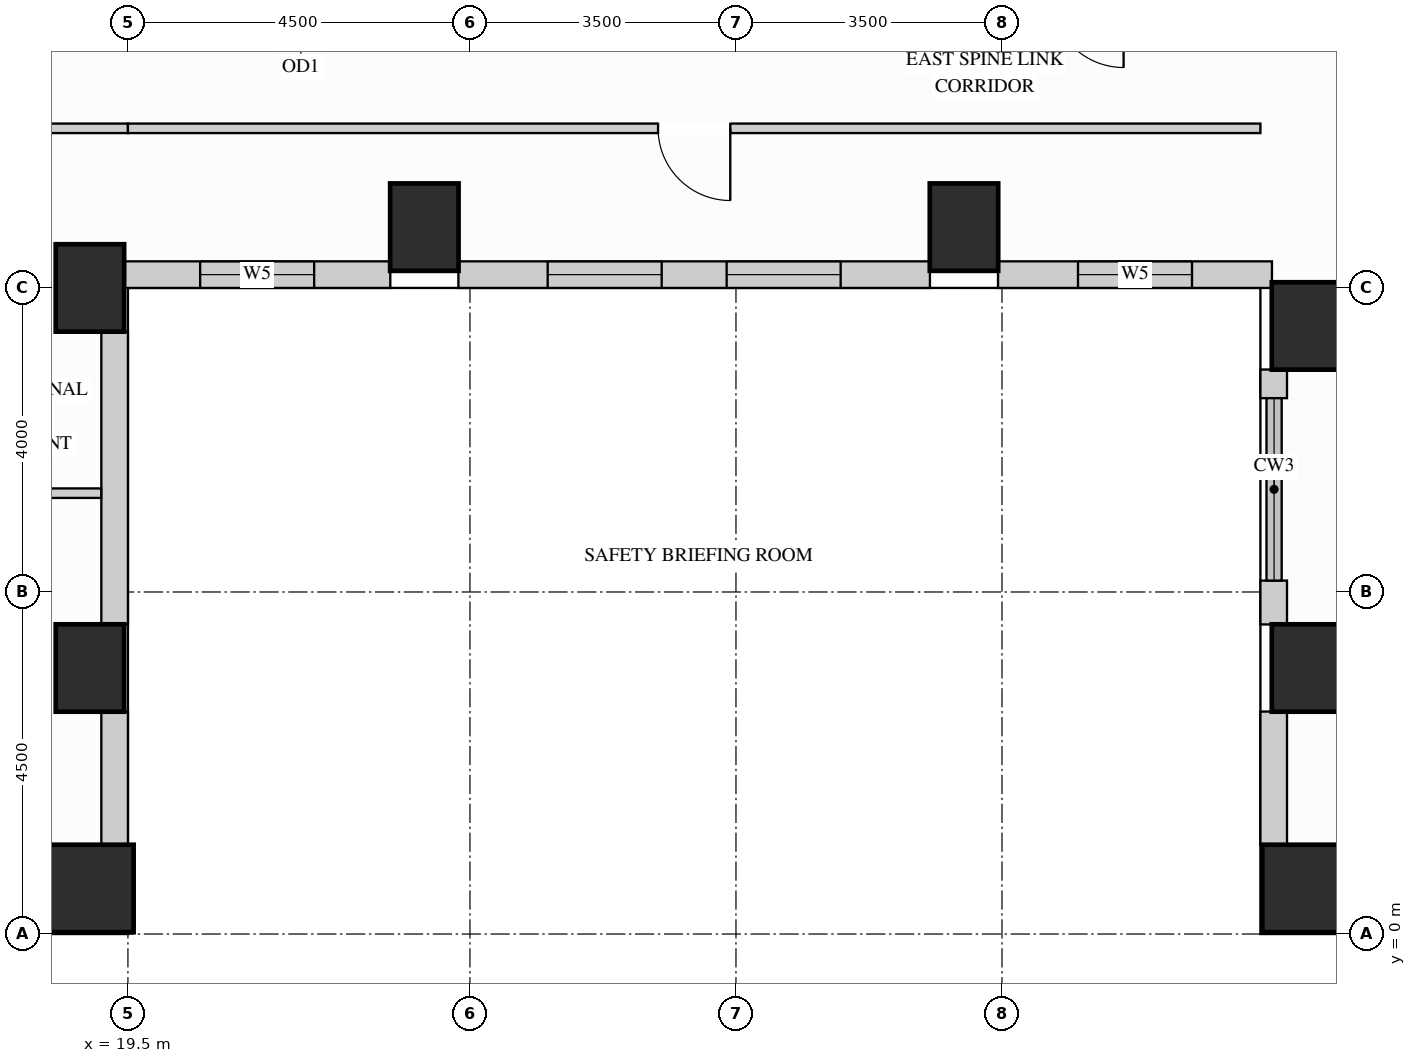
"""IFC4 building model, lengths in metres.
Left out: names, types, materials, properties, quantities, classifications, styles, units other than length and angle.
Written with IfcOpenShell. Run it as: python <this file> out.ifc"""

import sys

from ifc_helpers import new_model, si_unit, direction, frame, frame_2d, origin, origin_2d, place, context, subcontext, project, spatial, rectangle, extrude, source, transform, mapped, element, fill, save


model = new_model("IFC4")
c1 = context("Model", 3, precision=1e-05, world=origin(), true_north=direction((0.0, 1.0)))
c2 = subcontext(c1, "Body", "Model", "MODEL_VIEW")
j1 = project(units=[si_unit("LENGTHUNIT", "METRE"), si_unit("PLANEANGLEUNIT", "RADIAN")], contexts=[c1])
p1 = place(None, origin())
s1 = spatial("IfcSite", under=j1, at=p1, CompositionType="ELEMENT")
p2 = place(p1, origin())
s2 = spatial("IfcBuilding", under=s1, at=p2, CompositionType="ELEMENT")
p3 = place(p2, frame((0.0, 0.0, 117.0)))
s3 = spatial("IfcBuildingStorey", under=s2, at=p3, CompositionType="ELEMENT", Elevation=117.0)
m1 = source(origin(), c2, "Body", "SweptSolid", [
    extrude(rectangle(XDim=0.9, YDim=1.15, at=origin_2d()), origin(), (0.0, 0.0, 1.0), 3.38),
])
for number, where, z_axis, x_axis in (
    (1, (19.0, 3.5, 0.0), (0.0, 0.0, 1.0), (1.0, 0.0, 0.0)),
    (2, (19.0, 8.5, 0.0), (0.0, 0.0, 1.0), (1.0, 0.0, 0.0)),
    (3, (35.0, 3.5, 0.0), (0.0, 0.0, 1.0), (1.0, 0.0, 0.0)),
    (4, (35.0, 8.0, 0.0), (0.0, 0.0, 1.0), (1.0, 0.0, 0.0)),
    (5, (23.4, 9.3, 0.0), (0.0, 0.0, 1.0), (1.0, 0.0, 0.0)),
    (6, (30.5, 9.3, 0.0), (0.0, 0.0, 1.0), (1.0, 0.0, 0.0)),
):
    element("IfcColumn", number, at=place(p3, frame(where, z_axis=z_axis, x_axis=x_axis)), inside=s3, PredefinedType="COLUMN", context=c2, shape_type="MappedRepresentation", body=[
        mapped(m1, transform((0.0, 0.0, 0.0), x_axis=(1.0, 0.0, 0.0), y_axis=(0.0, 1.0, 0.0), z_axis=(0.0, 0.0, 1.0))),
    ])
m2 = source(origin(), c2, "Body", "SweptSolid", [
    extrude(rectangle(XDim=1.15, YDim=1.15, at=origin_2d()), origin(), (0.0, 0.0, 1.0), 3.38),
])
for number, where, z_axis, x_axis in (
    (7, (19.0, 0.6, 0.0), (0.0, 0.0, 1.0), (1.0, 0.0, 0.0)),
    (8, (35.0, 0.6, 0.0), (0.0, 0.0, 1.0), (1.0, 0.0, 0.0)),
):
    element("IfcColumn", number, at=place(p3, frame(where, z_axis=z_axis, x_axis=x_axis)), inside=s3, PredefinedType="COLUMN", context=c2, shape_type="MappedRepresentation", body=[
        mapped(m2, transform((0.0, 0.0, 0.0), x_axis=(1.0, 0.0, 0.0), y_axis=(0.0, 1.0, 0.0), z_axis=(0.0, 0.0, 1.0))),
    ])
m3 = source(origin(), c2, "Body", "SweptSolid", [
    extrude(rectangle(XDim=1.754, YDim=0.35, at=frame_2d((0.877, 0.0))), origin(), (0.0, 0.0, 1.0), 2.519),
])
p4 = place(p3, frame((19.325, 1.173, 0.0), z_axis=(0.0, 0.0, 1.0), x_axis=(0.0, 1.0, 0.0)))
e9 = element("IfcWall", 9, at=p4, inside=s3, PredefinedType="SOLIDWALL", context=c2, shape_type="MappedRepresentation", body=[
    mapped(m3, transform((0.0, 0.0, 0.0), x_axis=(1.0, 0.0, 0.0), y_axis=(0.0, 1.0, 0.0), z_axis=(0.0, 0.0, 1.0))),
])
m4 = source(origin(), c2, "Body", "SweptSolid", [
    extrude(rectangle(XDim=3.854, YDim=0.35, at=frame_2d((1.927, 0.0))), origin(), (0.0, 0.0, 1.0), 2.519),
])
p5 = place(p3, frame((19.325, 4.073, 0.0), z_axis=(0.0, 0.0, 1.0), x_axis=(0.0, 1.0, 0.0)))
e10 = element("IfcWall", 10, at=p5, inside=s3, PredefinedType="SOLIDWALL", context=c2, shape_type="MappedRepresentation", body=[
    mapped(m4, transform((0.0, 0.0, 0.0), x_axis=(1.0, 0.0, 0.0), y_axis=(0.0, 1.0, 0.0), z_axis=(0.0, 0.0, 1.0))),
])
p6 = place(p3, frame((19.448, 8.675, 0.0), z_axis=(0.0, 0.0, 1.0), x_axis=(1.0, 0.0, 0.0)))
e11 = element("IfcWall", 11, at=p6, inside=s3, PredefinedType="SOLIDWALL", context=c2, shape_type="SweptSolid", body=[
    extrude(rectangle(XDim=3.504, YDim=0.35, at=frame_2d((1.752, 0.0))), origin(), (0.0, 0.0, 1.0), 3.365),
])
p7 = place(p6, frame((1.002, 0.0, 0.78)))
e12 = element("IfcOpeningElement", 12, at=p7, cuts=e11, PredefinedType="OPENING", context=c2, shape_type="SweptSolid", body=[
    extrude(rectangle(XDim=1.5, YDim=2.0, at=frame_2d((0.75, 1.0))), frame((0.0, 0.185, 0.0), z_axis=(0.0, -1.0, 0.0), x_axis=(1.0, 0.0, 0.0)), (0.0, 0.0, 1.0), 0.37),
])
p8 = place(p3, frame((23.848, 8.675, 0.0), z_axis=(0.0, 0.0, 1.0), x_axis=(1.0, 0.0, 0.0)))
e13 = element("IfcWall", 13, at=p8, inside=s3, PredefinedType="SOLIDWALL", context=c2, shape_type="SweptSolid", body=[
    extrude(rectangle(XDim=6.204, YDim=0.35, at=frame_2d((3.102, 0.0))), origin(), (0.0, 0.0, 1.0), 3.365),
])
p9 = place(p8, frame((1.175, 0.0, 0.78)))
e14 = element("IfcOpeningElement", 14, at=p9, cuts=e13, PredefinedType="OPENING", context=c2, shape_type="SweptSolid", body=[
    extrude(rectangle(XDim=1.5, YDim=2.0, at=frame_2d((0.75, 1.0))), frame((0.0, 0.185, 0.0), z_axis=(0.0, -1.0, 0.0), x_axis=(1.0, 0.0, 0.0)), (0.0, 0.0, 1.0), 0.37),
])
p10 = place(p8, frame((3.529, 0.0, 0.78)))
e15 = element("IfcOpeningElement", 15, at=p10, cuts=e13, PredefinedType="OPENING", context=c2, shape_type="SweptSolid", body=[
    extrude(rectangle(XDim=1.5, YDim=2.0, at=frame_2d((0.75, 1.0))), frame((0.0, 0.185, 0.0), z_axis=(0.0, -1.0, 0.0), x_axis=(1.0, 0.0, 0.0)), (0.0, 0.0, 1.0), 0.37),
])
p11 = place(p3, frame((30.948, 8.675, 0.0), z_axis=(0.0, 0.0, 1.0), x_axis=(1.0, 0.0, 0.0)))
e16 = element("IfcWall", 16, at=p11, inside=s3, PredefinedType="SOLIDWALL", context=c2, shape_type="SweptSolid", body=[
    extrude(rectangle(XDim=3.604, YDim=0.35, at=frame_2d((1.802, 0.0))), origin(), (0.0, 0.0, 1.0), 3.365),
])
p12 = place(p11, frame((1.052, 0.0, 0.78)))
e17 = element("IfcOpeningElement", 17, at=p12, cuts=e16, PredefinedType="OPENING", context=c2, shape_type="SweptSolid", body=[
    extrude(rectangle(XDim=1.5, YDim=2.0, at=frame_2d((0.75, 1.0))), frame((0.0, 0.185, 0.0), z_axis=(0.0, -1.0, 0.0), x_axis=(1.0, 0.0, 0.0)), (0.0, 0.0, 1.0), 0.37),
])
m5 = source(origin(), c2, "Body", "SweptSolid", [
    extrude(rectangle(XDim=0.377, YDim=0.35, at=frame_2d((0.188, 0.0))), origin(), (0.0, 0.0, 1.0), 3.365),
])
p13 = place(p3, frame((34.575, 7.427, 0.0), z_axis=(0.0, 0.0, 1.0), x_axis=(0.0, -1.0, 0.0)))
e18 = element("IfcWall", 18, at=p13, inside=s3, PredefinedType="SOLIDWALL", context=c2, shape_type="MappedRepresentation", body=[
    mapped(m5, transform((0.0, 0.0, 0.0), x_axis=(1.0, 0.0, 0.0), y_axis=(0.0, 1.0, 0.0), z_axis=(0.0, 0.0, 1.0))),
])
m6 = source(origin(), c2, "Body", "SweptSolid", [
    extrude(rectangle(XDim=0.577, YDim=0.35, at=frame_2d((0.289, 0.0))), origin(), (0.0, 0.0, 1.0), 3.365),
])
p14 = place(p3, frame((34.575, 4.65, 0.0), z_axis=(0.0, 0.0, 1.0), x_axis=(0.0, -1.0, 0.0)))
e19 = element("IfcWall", 19, at=p14, inside=s3, PredefinedType="SOLIDWALL", context=c2, shape_type="MappedRepresentation", body=[
    mapped(m6, transform((0.0, 0.0, 0.0), x_axis=(1.0, 0.0, 0.0), y_axis=(0.0, 1.0, 0.0), z_axis=(0.0, 0.0, 1.0))),
])
m7 = source(origin(), c2, "Body", "SweptSolid", [
    extrude(rectangle(XDim=1.754, YDim=0.35, at=frame_2d((0.877, 0.0))), origin(), (0.0, 0.0, 1.0), 3.365),
])
p15 = place(p3, frame((34.575, 2.927, 0.0), z_axis=(0.0, 0.0, 1.0), x_axis=(0.0, -1.0, 0.0)))
e20 = element("IfcWall", 20, at=p15, inside=s3, PredefinedType="SOLIDWALL", context=c2, shape_type="MappedRepresentation", body=[
    mapped(m7, transform((0.0, 0.0, 0.0), x_axis=(1.0, 0.0, 0.0), y_axis=(0.0, 1.0, 0.0), z_axis=(0.0, 0.0, 1.0))),
])
m8 = source(origin(), c2, "Body", "SweptSolid", [
    extrude(rectangle(XDim=2.95, YDim=0.125, at=frame_2d((1.475, 0.0))), origin(), (0.0, 0.0, 1.0), 3.365),
])
p16 = place(p3, frame((16.55, 10.6, 0.0), z_axis=(0.0, 0.0, 1.0), x_axis=(1.0, 0.0, 0.0)))
e21 = element("IfcWall", 21, at=p16, inside=s3, PredefinedType="PARTITIONING", context=c2, shape_type="MappedRepresentation", body=[
    mapped(m8, transform((0.0, 0.0, 0.0), x_axis=(1.0, 0.0, 0.0), y_axis=(0.0, 1.0, 0.0), z_axis=(0.0, 0.0, 1.0))),
])
p17 = place(p3, frame((19.5, 10.6, 0.0), z_axis=(0.0, 0.0, 1.0), x_axis=(1.0, 0.0, 0.0)))
e22 = element("IfcWall", 22, at=p17, inside=s3, PredefinedType="PARTITIONING", context=c2, shape_type="SweptSolid", body=[
    extrude(rectangle(XDim=14.9, YDim=0.125, at=frame_2d((7.45, 0.0))), origin(), (0.0, 0.0, 1.0), 3.365),
])
p18 = place(p17, frame((6.975, 0.0, 0.0)))
e23 = element("IfcOpeningElement", 23, at=p18, cuts=e22, PredefinedType="OPENING", context=c2, shape_type="SweptSolid", body=[
    extrude(rectangle(XDim=0.95, YDim=2.15, at=frame_2d((0.475, 1.075))), frame((0.0, 0.073, 0.0), z_axis=(0.0, -1.0, 0.0), x_axis=(1.0, 0.0, 0.0)), (0.0, 0.0, 1.0), 0.145),
])
m9 = source(origin(), c2, "Body", "SweptSolid", [
    extrude(rectangle(XDim=2.598, YDim=0.125, at=frame_2d((1.299, 0.0))), origin(), (0.0, 0.0, 1.0), 3.365),
])
p19 = place(p3, frame((16.55, 5.8, 0.0), z_axis=(0.0, 0.0, 1.0), x_axis=(1.0, 0.0, 0.0)))
e24 = element("IfcWall", 24, at=p19, inside=s3, PredefinedType="PARTITIONING", context=c2, shape_type="MappedRepresentation", body=[
    mapped(m9, transform((0.0, 0.0, 0.0), x_axis=(1.0, 0.0, 0.0), y_axis=(0.0, 1.0, 0.0), z_axis=(0.0, 0.0, 1.0))),
])
m10 = source(origin(), c2, "Body", "SweptSolid", [
    extrude(rectangle(XDim=0.95, YDim=2.15, at=frame_2d((0.475, 1.075))), frame((0.0, 0.025, 0.0), z_axis=(0.0, -1.0, 0.0), x_axis=(1.0, 0.0, 0.0)), (0.0, 0.0, 1.0), 0.05),
])
p20 = place(p18, origin())
e25 = element("IfcDoor", 25, at=p20, inside=s3, OperationType="SINGLE_SWING_RIGHT", PredefinedType="DOOR", context=c2, shape_type="MappedRepresentation", body=[
    mapped(m10, transform((0.0, 0.0, 0.0), x_axis=(1.0, 0.0, 0.0), y_axis=(0.0, 1.0, 0.0), z_axis=(0.0, 0.0, 1.0))),
])
fill(e23, e25)
m11 = source(origin(), c2, "Body", "SweptSolid", [
    extrude(rectangle(XDim=1.5, YDim=2.0, at=frame_2d((0.75, 1.0))), frame((0.0, 0.03, 0.0), z_axis=(0.0, -1.0, 0.0), x_axis=(1.0, 0.0, 0.0)), (0.0, 0.0, 1.0), 0.06),
])
p21 = place(p7, origin())
e26 = element("IfcWindow", 26, at=p21, inside=s3, PartitioningType="SINGLE_PANEL", PredefinedType="WINDOW", context=c2, shape_type="MappedRepresentation", body=[
    mapped(m11, transform((0.0, 0.0, 0.0), x_axis=(1.0, 0.0, 0.0), y_axis=(0.0, 1.0, 0.0), z_axis=(0.0, 0.0, 1.0))),
])
fill(e12, e26)
p22 = place(p9, origin())
e27 = element("IfcWindow", 27, at=p22, inside=s3, PartitioningType="SINGLE_PANEL", PredefinedType="WINDOW", context=c2, shape_type="MappedRepresentation", body=[
    mapped(m11, transform((0.0, 0.0, 0.0), x_axis=(1.0, 0.0, 0.0), y_axis=(0.0, 1.0, 0.0), z_axis=(0.0, 0.0, 1.0))),
])
fill(e14, e27)
p23 = place(p10, origin())
e28 = element("IfcWindow", 28, at=p23, inside=s3, PartitioningType="SINGLE_PANEL", PredefinedType="WINDOW", context=c2, shape_type="MappedRepresentation", body=[
    mapped(m11, transform((0.0, 0.0, 0.0), x_axis=(1.0, 0.0, 0.0), y_axis=(0.0, 1.0, 0.0), z_axis=(0.0, 0.0, 1.0))),
])
fill(e15, e28)
p24 = place(p12, origin())
e29 = element("IfcWindow", 29, at=p24, inside=s3, PartitioningType="SINGLE_PANEL", PredefinedType="WINDOW", context=c2, shape_type="MappedRepresentation", body=[
    mapped(m11, transform((0.0, 0.0, 0.0), x_axis=(1.0, 0.0, 0.0), y_axis=(0.0, 1.0, 0.0), z_axis=(0.0, 0.0, 1.0))),
])
fill(e17, e29)
save(model, sys.argv[1])
